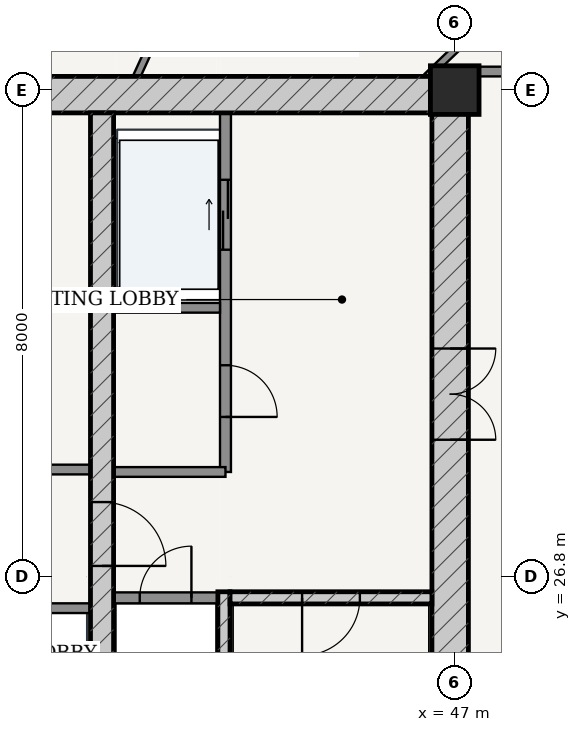
"""IFC4 building model, lengths in metres.
Left out: names, types, materials, properties, quantities, classifications, styles, units other than length and angle.
Written with IfcOpenShell. Run it as: python <this file> out.ifc"""

import sys

from ifc_helpers import new_model, si_unit, direction, frame, frame_2d, origin, origin_2d, place, context, subcontext, project, spatial, rectangle, extrude, source, transform, mapped, element, fill, save


model = new_model("IFC4")
c1 = context("Model", 3, precision=1e-05, world=origin(), true_north=direction((-0.2419218956, 0.970295726276)))
c2 = subcontext(c1, "Body", "Model", "MODEL_VIEW")
j1 = project(units=[si_unit("LENGTHUNIT", "METRE"), si_unit("PLANEANGLEUNIT", "RADIAN")], contexts=[c1])
p1 = place(None, origin())
s1 = spatial("IfcSite", under=j1, at=p1, CompositionType="ELEMENT")
p2 = place(p1, origin())
s2 = spatial("IfcBuilding", under=s1, at=p2, CompositionType="ELEMENT")
p3 = place(p2, frame((0.0, 0.0, 209.7)))
s3 = spatial("IfcBuildingStorey", under=s2, at=p3, CompositionType="ELEMENT", Elevation=209.7)
p4 = place(p3, frame((47.0, 34.8, 0.0), z_axis=(0.0, 0.0, 1.0), x_axis=(1.0, 0.0, 0.0)))
e1 = element("IfcColumn", 1, at=p4, inside=s3, PredefinedType="COLUMN", context=c2, shape_type="SweptSolid", body=[
    extrude(rectangle(XDim=0.8, YDim=0.8, at=origin_2d()), origin(), (0.0, 0.0, 1.0), 3.7),
])
p5 = place(p3, frame((28.775, 34.725, 0.0), z_axis=(0.0, 0.0, 1.0), x_axis=(1.0, 0.0, 0.0)))
e2 = element("IfcWall", 2, at=p5, inside=s3, PredefinedType="SHEAR", context=c2, shape_type="SweptSolid", body=[
    extrude(rectangle(XDim=18.45, YDim=0.6, at=frame_2d((9.225, 0.0))), origin(), (0.0, 0.0, 1.0), 3.435),
])
p6 = place(p3, frame((46.925, 19.175, 0.0), z_axis=(0.0, 0.0, 1.0), x_axis=(0.0, 1.0, 0.0)))
e3 = element("IfcWall", 3, at=p6, inside=s3, PredefinedType="SHEAR", context=c2, shape_type="SweptSolid", body=[
    extrude(rectangle(XDim=15.25, YDim=0.6, at=frame_2d((7.625, 0.0))), origin(), (0.0, 0.0, 1.0), 3.435),
])
p7 = place(p6, frame((9.875, 0.0, 0.0)))
e4 = element("IfcOpeningElement", 4, at=p7, cuts=e3, PredefinedType="OPENING", context=c2, shape_type="SweptSolid", body=[
    extrude(rectangle(XDim=1.5, YDim=2.2, at=frame_2d((0.75, 1.1))), frame((0.0, 0.31, 0.0), z_axis=(0.0, -1.0, 0.0), x_axis=(1.0, 0.0, 0.0)), (0.0, 0.0, 1.0), 0.62),
])
p8 = place(p3, frame((43.205, 19.175, 0.0), z_axis=(0.0, 0.0, 1.0), x_axis=(0.0, 1.0, 0.0)))
e5 = element("IfcWall", 5, at=p8, inside=s3, PredefinedType="SOLIDWALL", context=c2, shape_type="SweptSolid", body=[
    extrude(rectangle(XDim=7.375, YDim=0.2, at=frame_2d((3.688, 0.0))), origin(), (0.0, 0.0, 1.0), 3.435),
])
p9 = place(p3, frame((43.305, 26.45, 0.0), z_axis=(0.0, 0.0, 1.0), x_axis=(1.0, 0.0, 0.0)))
e6 = element("IfcWall", 6, at=p9, inside=s3, PredefinedType="SOLIDWALL", context=c2, shape_type="SweptSolid", body=[
    extrude(rectangle(XDim=3.32, YDim=0.2, at=frame_2d((1.66, 0.0))), origin(), (0.0, 0.0, 1.0), 3.435),
])
p10 = place(p9, frame((1.185, 0.0, 0.0)))
e7 = element("IfcOpeningElement", 7, at=p10, cuts=e6, PredefinedType="OPENING", context=c2, shape_type="SweptSolid", body=[
    extrude(rectangle(XDim=0.95, YDim=2.15, at=frame_2d((0.475, 1.075))), frame((0.0, 0.11, 0.0), z_axis=(0.0, -1.0, 0.0), x_axis=(1.0, 0.0, 0.0)), (0.0, 0.0, 1.0), 0.22),
])
p11 = place(p3, frame((41.2, 19.175, 0.0), z_axis=(0.0, 0.0, 1.0), x_axis=(0.0, 1.0, 0.0)))
e8 = element("IfcWall", 8, at=p11, inside=s3, PredefinedType="SHEAR", context=c2, shape_type="SweptSolid", body=[
    extrude(rectangle(XDim=15.25, YDim=0.38, at=frame_2d((7.625, 0.0))), origin(), (0.0, 0.0, 1.0), 3.435),
])
p12 = place(p11, frame((7.8, 0.0, 0.0)))
e9 = element("IfcOpeningElement", 9, at=p12, cuts=e8, PredefinedType="OPENING", context=c2, shape_type="SweptSolid", body=[
    extrude(rectangle(XDim=1.05, YDim=2.15, at=frame_2d((0.525, 1.075))), frame((0.0, 0.2, 0.0), z_axis=(0.0, -1.0, 0.0), x_axis=(1.0, 0.0, 0.0)), (0.0, 0.0, 1.0), 0.4),
])
p13 = place(p3, frame((41.39, 26.45, 0.0), z_axis=(0.0, 0.0, 1.0), x_axis=(1.0, 0.0, 0.0)))
e10 = element("IfcWall", 10, at=p13, inside=s3, PredefinedType="PARTITIONING", context=c2, shape_type="SweptSolid", body=[
    extrude(rectangle(XDim=1.71, YDim=0.18, at=frame_2d((0.855, 0.0))), origin(), (0.0, 0.0, 1.0), 3.435),
])
p14 = place(p13, frame((0.43, 0.0, 0.0)))
e11 = element("IfcOpeningElement", 11, at=p14, cuts=e10, PredefinedType="OPENING", context=c2, shape_type="SweptSolid", body=[
    extrude(rectangle(XDim=0.85, YDim=2.1, at=frame_2d((0.425, 1.05))), frame((0.0, 0.1, 0.0), z_axis=(0.0, -1.0, 0.0), x_axis=(1.0, 0.0, 0.0)), (0.0, 0.0, 1.0), 0.2),
])
p15 = place(p3, frame((43.23, 28.52, 0.0), z_axis=(0.0, 0.0, 1.0), x_axis=(0.0, 1.0, 0.0)))
e12 = element("IfcWall", 12, at=p15, inside=s3, PredefinedType="PARTITIONING", context=c2, shape_type="SweptSolid", body=[
    extrude(rectangle(XDim=5.905, YDim=0.18, at=frame_2d((2.953, 0.0))), origin(), (0.0, 0.0, 1.0), 3.435),
])
p16 = place(p15, frame((0.905, 0.0, 0.0)))
e13 = element("IfcOpeningElement", 13, at=p16, cuts=e12, PredefinedType="OPENING", context=c2, shape_type="SweptSolid", body=[
    extrude(rectangle(XDim=0.85, YDim=2.1, at=frame_2d((0.425, 1.05))), frame((0.0, 0.1, 0.0), z_axis=(0.0, -1.0, 0.0), x_axis=(1.0, 0.0, 0.0)), (0.0, 0.0, 1.0), 0.2),
])
p17 = place(p15, frame((3.655, 0.0, 0.0)))
e14 = element("IfcOpeningElement", 14, at=p17, cuts=e12, PredefinedType="OPENING", context=c2, shape_type="SweptSolid", body=[
    extrude(rectangle(XDim=1.15, YDim=2.2, at=frame_2d((0.575, 1.1))), frame((0.0, 0.1, 0.0), z_axis=(0.0, -1.0, 0.0), x_axis=(1.0, 0.0, 0.0)), (0.0, 0.0, 1.0), 0.2),
])
p18 = place(p3, frame((41.39, 31.22, 0.0), z_axis=(0.0, 0.0, 1.0), x_axis=(1.0, 0.0, 0.0)))
e15 = element("IfcWall", 15, at=p18, inside=s3, PredefinedType="PARTITIONING", context=c2, shape_type="SweptSolid", body=[
    extrude(rectangle(XDim=1.75, YDim=0.16, at=frame_2d((0.875, 0.0))), origin(), (0.0, 0.0, 1.0), 3.435),
])
p19 = place(p3, frame((41.39, 28.52, 0.0), z_axis=(0.0, 0.0, 1.0), x_axis=(1.0, 0.0, 0.0)))
e16 = element("IfcWall", 16, at=p19, inside=s3, PredefinedType="PARTITIONING", context=c2, shape_type="SweptSolid", body=[
    extrude(rectangle(XDim=1.84, YDim=0.16, at=frame_2d((0.92, 0.0))), origin(), (0.0, 0.0, 1.0), 3.435),
])
p20 = place(p3, frame((34.99, 28.56, 0.0), z_axis=(0.0, 0.0, 1.0), x_axis=(1.0, 0.0, 0.0)))
e17 = element("IfcWall", 17, at=p20, inside=s3, PredefinedType="PARTITIONING", context=c2, shape_type="SweptSolid", body=[
    extrude(rectangle(XDim=6.02, YDim=0.16, at=frame_2d((3.01, 0.0))), origin(), (0.0, 0.0, 1.0), 3.435),
])
p21 = place(p20, frame((1.025, 0.0, 0.0)))
e18 = element("IfcOpeningElement", 18, at=p21, cuts=e17, PredefinedType="OPENING", context=c2, shape_type="SweptSolid", body=[
    extrude(rectangle(XDim=0.86, YDim=2.1, at=frame_2d((0.43, 1.05))), frame((0.0, 0.09, 0.0), z_axis=(0.0, -1.0, 0.0), x_axis=(1.0, 0.0, 0.0)), (0.0, 0.0, 1.0), 0.18),
])
p22 = place(p20, frame((4.14, 0.0, 0.0)))
e19 = element("IfcOpeningElement", 19, at=p22, cuts=e17, PredefinedType="OPENING", context=c2, shape_type="SweptSolid", body=[
    extrude(rectangle(XDim=0.85, YDim=2.1, at=frame_2d((0.425, 1.05))), frame((0.0, 0.09, 0.0), z_axis=(0.0, -1.0, 0.0), x_axis=(1.0, 0.0, 0.0)), (0.0, 0.0, 1.0), 0.18),
])
p23 = place(p3, frame((34.99, 26.28, 0.0), z_axis=(0.0, 0.0, 1.0), x_axis=(1.0, 0.0, 0.0)))
e20 = element("IfcWall", 20, at=p23, inside=s3, PredefinedType="PARTITIONING", context=c2, shape_type="SweptSolid", body=[
    extrude(rectangle(XDim=6.02, YDim=0.16, at=frame_2d((3.01, 0.0))), origin(), (0.0, 0.0, 1.0), 3.435),
])
p24 = place(p23, frame((0.225, 0.0, 0.0)))
e21 = element("IfcOpeningElement", 21, at=p24, cuts=e20, PredefinedType="OPENING", context=c2, shape_type="SweptSolid", body=[
    extrude(rectangle(XDim=1.1, YDim=2.2, at=frame_2d((0.55, 1.1))), frame((0.0, 0.09, 0.0), z_axis=(0.0, -1.0, 0.0), x_axis=(1.0, 0.0, 0.0)), (0.0, 0.0, 1.0), 0.18),
])
p25 = place(p23, frame((1.705, 0.0, 0.0)))
e22 = element("IfcOpeningElement", 22, at=p25, cuts=e20, PredefinedType="OPENING", context=c2, shape_type="SweptSolid", body=[
    extrude(rectangle(XDim=1.1, YDim=2.2, at=frame_2d((0.55, 1.1))), frame((0.0, 0.09, 0.0), z_axis=(0.0, -1.0, 0.0), x_axis=(1.0, 0.0, 0.0)), (0.0, 0.0, 1.0), 0.18),
])
p26 = place(p3, frame((47.225, 35.105, 0.0), z_axis=(0.0, 0.0, 1.0), x_axis=(1.0, 0.0, 0.0)))
e23 = element("IfcWall", 23, at=p26, inside=s3, PredefinedType="PARTITIONING", context=c2, shape_type="SweptSolid", body=[
    extrude(rectangle(XDim=1.93, YDim=0.16, at=frame_2d((0.965, 0.0))), origin(), (0.0, 0.0, 1.0), 3.435),
])
p27 = place(p3, frame((46.549, 35.026, 0.0), z_axis=(0.0, 0.0, 1.0), x_axis=(0.720557461206, 0.693395230082, 0.0)))
e24 = element("IfcWall", 24, at=p27, inside=s3, PredefinedType="PARTITIONING", context=c2, shape_type="SweptSolid", body=[
    extrude(rectangle(XDim=3.541, YDim=0.12, at=frame_2d((1.771, 0.0))), origin(), (0.0, 0.0, 1.0), 2.951),
])
p28 = place(p27, frame((1.419, 0.0, 0.0)))
e25 = element("IfcOpeningElement", 25, at=p28, cuts=e24, PredefinedType="OPENING", context=c2, shape_type="SweptSolid", body=[
    extrude(rectangle(XDim=0.9, YDim=2.15, at=frame_2d((0.45, 1.075))), frame((0.0, 0.07, 0.0), z_axis=(0.0, -1.0, 0.0), x_axis=(1.0, 0.0, 0.0)), (0.0, 0.0, 1.0), 0.14),
])
p29 = place(p3, frame((41.771, 35.027, 0.0), z_axis=(0.0, 0.0, 1.0), x_axis=(0.416688202143, 0.909049471808, 0.0)))
e26 = element("IfcWall", 26, at=p29, inside=s3, PredefinedType="PARTITIONING", context=c2, shape_type="SweptSolid", body=[
    extrude(rectangle(XDim=2.51, YDim=0.12, at=frame_2d((1.255, 0.0))), origin(), (0.0, 0.0, 1.0), 3.435),
])
m1 = source(origin(), c2, "Body", "SweptSolid", [
    extrude(rectangle(XDim=1.5, YDim=2.2, at=frame_2d((0.75, 1.1))), frame((0.0, 0.025, 0.0), z_axis=(0.0, -1.0, 0.0), x_axis=(1.0, 0.0, 0.0)), (0.0, 0.0, 1.0), 0.05),
])
p30 = place(p7, frame((1.5, 0.0, 0.0), z_axis=(0.0, 0.0, 1.0), x_axis=(-1.0, 0.0, 0.0)))
e27 = element("IfcDoor", 27, at=p30, inside=s3, OperationType="DOUBLE_DOOR_SINGLE_SWING", PredefinedType="DOOR", context=c2, shape_type="MappedRepresentation", body=[
    mapped(m1, transform((0.0, 0.0, 0.0), scale=1.0)),
])
fill(e4, e27)
m2 = source(origin(), c2, "Body", "SweptSolid", [
    extrude(rectangle(XDim=1.05, YDim=2.15, at=frame_2d((0.525, 1.075))), frame((0.0, 0.025, 0.0), z_axis=(0.0, -1.0, 0.0), x_axis=(1.0, 0.0, 0.0)), (0.0, 0.0, 1.0), 0.05),
])
p31 = place(p12, frame((1.05, 0.0, 0.0), z_axis=(0.0, 0.0, 1.0), x_axis=(-1.0, 0.0, 0.0)))
e28 = element("IfcDoor", 28, at=p31, inside=s3, OperationType="SINGLE_SWING_RIGHT", PredefinedType="DOOR", context=c2, shape_type="MappedRepresentation", body=[
    mapped(m2, transform((0.0, 0.0, 0.0), scale=1.0)),
])
fill(e9, e28)
m3 = source(origin(), c2, "Body", "SweptSolid", [
    extrude(rectangle(XDim=0.95, YDim=2.15, at=frame_2d((0.475, 1.075))), frame((0.0, 0.025, 0.0), z_axis=(0.0, -1.0, 0.0), x_axis=(1.0, 0.0, 0.0)), (0.0, 0.0, 1.0), 0.05),
])
p32 = place(p10, frame((0.95, 0.0, 0.0), z_axis=(0.0, 0.0, 1.0), x_axis=(-1.0, 0.0, 0.0)))
e29 = element("IfcDoor", 29, at=p32, inside=s3, OperationType="SINGLE_SWING_RIGHT", PredefinedType="DOOR", context=c2, shape_type="MappedRepresentation", body=[
    mapped(m3, transform((0.0, 0.0, 0.0), scale=1.0)),
])
fill(e7, e29)
m4 = source(origin(), c2, "Body", "SweptSolid", [
    extrude(rectangle(XDim=0.85, YDim=2.1, at=frame_2d((0.425, 1.05))), frame((0.0, 0.025, 0.0), z_axis=(0.0, -1.0, 0.0), x_axis=(1.0, 0.0, 0.0)), (0.0, 0.0, 1.0), 0.05),
])
p33 = place(p14, origin())
e30 = element("IfcDoor", 30, at=p33, inside=s3, OperationType="SINGLE_SWING_RIGHT", PredefinedType="DOOR", context=c2, shape_type="MappedRepresentation", body=[
    mapped(m4, transform((0.0, 0.0, 0.0), scale=1.0)),
])
fill(e11, e30)
p34 = place(p16, frame((0.85, 0.0, 0.0), z_axis=(0.0, 0.0, 1.0), x_axis=(-1.0, 0.0, 0.0)))
e31 = element("IfcDoor", 31, at=p34, inside=s3, OperationType="SINGLE_SWING_RIGHT", PredefinedType="DOOR", context=c2, shape_type="MappedRepresentation", body=[
    mapped(m4, transform((0.0, 0.0, 0.0), scale=1.0)),
])
fill(e13, e31)
m5 = source(origin(), c2, "Body", "SweptSolid", [
    extrude(rectangle(XDim=1.15, YDim=2.2, at=frame_2d((0.575, 1.1))), frame((0.0, 0.025, 0.0), z_axis=(0.0, -1.0, 0.0), x_axis=(1.0, 0.0, 0.0)), (0.0, 0.0, 1.0), 0.05),
])
p35 = place(p17, origin())
e32 = element("IfcDoor", 32, at=p35, inside=s3, OperationType="DOUBLE_DOOR_SLIDING", PredefinedType="DOOR", context=c2, shape_type="MappedRepresentation", body=[
    mapped(m5, transform((0.0, 0.0, 0.0), scale=1.0)),
])
fill(e14, e32)
save(model, sys.argv[1])
